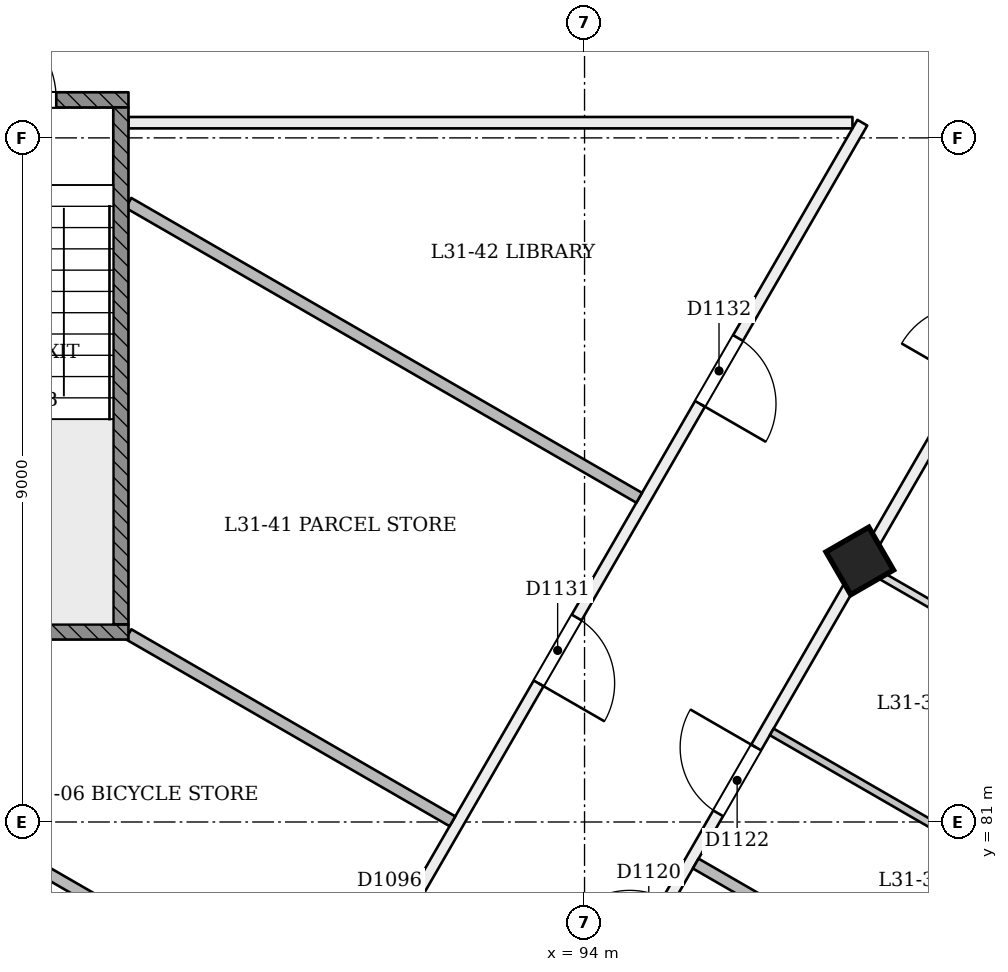
"""IFC4 building model, lengths in metres.
Left out: names, types, materials, properties, quantities, classifications, styles, units other than length and angle.
Written with IfcOpenShell. Run it as: python <this file> out.ifc"""

import sys

from ifc_helpers import new_model, si_unit, direction, frame, frame_2d, origin, origin_2d, place, context, subcontext, project, spatial, rectangle, extrude, element, fill, save


model = new_model("IFC4")
c1 = context("Model", 3, precision=1e-05, world=origin(), true_north=direction((0.0, 1.0)))
c2 = subcontext(c1, "Body", "Model", "MODEL_VIEW")
j1 = project(units=[si_unit("LENGTHUNIT", "METRE"), si_unit("PLANEANGLEUNIT", "RADIAN")], contexts=[c1])
p1 = place(None, origin())
s1 = spatial("IfcSite", under=j1, at=p1, CompositionType="ELEMENT")
p2 = place(p1, origin())
s2 = spatial("IfcBuilding", under=s1, at=p2, CompositionType="ELEMENT")
p3 = place(p2, frame((0.0, 0.0, 124.2)))
s3 = spatial("IfcBuildingStorey", under=s2, at=p3, CompositionType="ELEMENT", Elevation=124.2)
p4 = place(p3, frame((97.648, 84.387, -0.02), z_axis=(-0.022221406801, 0.038413224561, 0.999014831351), x_axis=(-0.499510250399, -0.866023767971, 0.022188804714)))
e1 = element("IfcColumn", 1, at=p4, inside=s3, PredefinedType="COLUMN", context=c2, shape_type="SweptSolid", body=[
    extrude(rectangle(XDim=0.65, YDim=0.65, at=origin_2d()), origin(), (0.0, 0.0, 1.0), 3.604),
])
p5 = place(p3, frame((97.655, 90.2, 0.0), z_axis=(0.0, 0.0, 1.0), x_axis=(-0.5000058613, -0.866022019735, 0.0)))
e2 = element("IfcWall", 2, at=p5, inside=s3, PredefinedType="PARTITIONING", context=c2, shape_type="SweptSolid", body=[
    extrude(rectangle(XDim=25.179, YDim=0.15, at=frame_2d((12.59, 0.0))), origin(), (0.0, 0.0, 1.0), 3.15),
])
p6 = place(p5, frame((11.939, 0.0, 0.0)))
e3 = element("IfcOpeningElement", 3, at=p6, cuts=e2, PredefinedType="OPENING", context=c2, shape_type="SweptSolid", body=[
    extrude(rectangle(XDim=1.0, YDim=2.1, at=frame_2d((0.5, 1.05))), frame((0.0, 0.085, 0.0), z_axis=(0.0, -1.0, 0.0), x_axis=(1.0, 0.0, 0.0)), (0.0, 0.0, 1.0), 0.171),
])
p7 = place(p5, frame((7.517, 0.0, 0.0)))
e4 = element("IfcOpeningElement", 4, at=p7, cuts=e2, PredefinedType="OPENING", context=c2, shape_type="SweptSolid", body=[
    extrude(rectangle(XDim=1.0, YDim=2.1, at=frame_2d((0.5, 1.05))), frame((0.0, 0.085, 0.0), z_axis=(0.0, -1.0, 0.0), x_axis=(1.0, 0.0, 0.0)), (0.0, 0.0, 1.0), 0.171),
])
p8 = place(p5, frame((3.271, 0.0, 0.0)))
e5 = element("IfcOpeningElement", 5, at=p8, cuts=e2, PredefinedType="OPENING", context=c2, shape_type="SweptSolid", body=[
    extrude(rectangle(XDim=1.0, YDim=2.1, at=frame_2d((0.5, 1.05))), frame((0.0, 0.085, 0.0), z_axis=(0.0, -1.0, 0.0), x_axis=(1.0, 0.0, 0.0)), (0.0, 0.0, 1.0), 0.171),
])
p9 = place(p5, frame((14.95, 0.0, 0.0)))
e6 = element("IfcOpeningElement", 6, at=p9, cuts=e2, PredefinedType="OPENING", context=c2, shape_type="SweptSolid", body=[
    extrude(rectangle(XDim=1.0, YDim=2.1, at=frame_2d((0.5, 1.05))), frame((0.0, 0.085, 0.0), z_axis=(0.0, -1.0, 0.0), x_axis=(1.0, 0.0, 0.0)), (0.0, 0.0, 1.0), 0.171),
])
p10 = place(p5, frame((18.033, 0.0, 0.0)))
e7 = element("IfcOpeningElement", 7, at=p10, cuts=e2, PredefinedType="OPENING", context=c2, shape_type="SweptSolid", body=[
    extrude(rectangle(XDim=1.0, YDim=2.1, at=frame_2d((0.5, 1.05))), frame((0.0, 0.085, 0.0), z_axis=(0.0, -1.0, 0.0), x_axis=(1.0, 0.0, 0.0)), (0.0, 0.0, 1.0), 0.171),
])
p11 = place(p3, frame((85.208, 62.842, 0.0), z_axis=(0.0, 0.0, 1.0), x_axis=(0.499999338616, 0.866025785634, 0.0)))
e8 = element("IfcWall", 8, at=p11, inside=s3, PredefinedType="PARTITIONING", context=c2, shape_type="SweptSolid", body=[
    extrude(rectangle(XDim=40.758, YDim=0.15, at=frame_2d((20.379, 0.0))), origin(), (0.0, 0.0, 1.0), 2.75),
])
p12 = place(p11, frame((0.295, 0.0, 0.0)))
e9 = element("IfcOpeningElement", 9, at=p12, cuts=e8, PredefinedType="OPENING", context=c2, shape_type="SweptSolid", body=[
    extrude(rectangle(XDim=1.2, YDim=2.1, at=frame_2d((0.6, 1.05))), frame((0.0, 0.085, 0.0), z_axis=(0.0, -1.0, 0.0), x_axis=(1.0, 0.0, 0.0)), (0.0, 0.0, 1.0), 0.171),
])
p13 = place(p11, frame((4.129, 0.0, 0.0)))
e10 = element("IfcOpeningElement", 10, at=p13, cuts=e8, PredefinedType="OPENING", context=c2, shape_type="SweptSolid", body=[
    extrude(rectangle(XDim=1.0, YDim=2.1, at=frame_2d((0.5, 1.05))), frame((0.0, 0.085, 0.0), z_axis=(0.0, -1.0, 0.0), x_axis=(1.0, 0.0, 0.0)), (0.0, 0.0, 1.0), 0.171),
])
p14 = place(p11, frame((9.659, 0.0, 0.0)))
e11 = element("IfcOpeningElement", 11, at=p14, cuts=e8, PredefinedType="OPENING", context=c2, shape_type="SweptSolid", body=[
    extrude(rectangle(XDim=1.0, YDim=2.1, at=frame_2d((0.5, 1.05))), frame((0.0, 0.085, 0.0), z_axis=(0.0, -1.0, 0.0), x_axis=(1.0, 0.0, 0.0)), (0.0, 0.0, 1.0), 0.171),
])
p15 = place(p11, frame((11.984, 0.0, 0.0)))
e12 = element("IfcOpeningElement", 12, at=p15, cuts=e8, PredefinedType="OPENING", context=c2, shape_type="SweptSolid", body=[
    extrude(rectangle(XDim=1.0, YDim=2.1, at=frame_2d((0.5, 1.05))), frame((0.0, 0.085, 0.0), z_axis=(0.0, -1.0, 0.0), x_axis=(1.0, 0.0, 0.0)), (0.0, 0.0, 1.0), 0.171),
])
p16 = place(p11, frame((18.774, 0.0, 0.0)))
e13 = element("IfcOpeningElement", 13, at=p16, cuts=e8, PredefinedType="OPENING", context=c2, shape_type="SweptSolid", body=[
    extrude(rectangle(XDim=1.0, YDim=2.1, at=frame_2d((0.5, 1.05))), frame((0.0, 0.085, 0.0), z_axis=(0.0, -1.0, 0.0), x_axis=(1.0, 0.0, 0.0)), (0.0, 0.0, 1.0), 0.171),
])
p17 = place(p11, frame((21.099, 0.0, 0.0)))
e14 = element("IfcOpeningElement", 14, at=p17, cuts=e8, PredefinedType="OPENING", context=c2, shape_type="SweptSolid", body=[
    extrude(rectangle(XDim=1.0, YDim=2.1, at=frame_2d((0.5, 1.05))), frame((0.0, 0.085, 0.0), z_axis=(0.0, -1.0, 0.0), x_axis=(1.0, 0.0, 0.0)), (0.0, 0.0, 1.0), 0.171),
])
p18 = place(p11, frame((27.659, 0.0, 0.0)))
e15 = element("IfcOpeningElement", 15, at=p18, cuts=e8, PredefinedType="OPENING", context=c2, shape_type="SweptSolid", body=[
    extrude(rectangle(XDim=1.0, YDim=2.1, at=frame_2d((0.5, 1.05))), frame((0.0, 0.085, 0.0), z_axis=(0.0, -1.0, 0.0), x_axis=(1.0, 0.0, 0.0)), (0.0, 0.0, 1.0), 0.171),
])
p19 = place(p11, frame((30.099, 0.0, 0.0)))
e16 = element("IfcOpeningElement", 16, at=p19, cuts=e8, PredefinedType="OPENING", context=c2, shape_type="SweptSolid", body=[
    extrude(rectangle(XDim=1.0, YDim=2.1, at=frame_2d((0.5, 1.05))), frame((0.0, 0.085, 0.0), z_axis=(0.0, -1.0, 0.0), x_axis=(1.0, 0.0, 0.0)), (0.0, 0.0, 1.0), 0.171),
])
p20 = place(p11, frame((39.358, 0.0, 0.0)))
e17 = element("IfcOpeningElement", 17, at=p20, cuts=e8, PredefinedType="OPENING", context=c2, shape_type="SweptSolid", body=[
    extrude(rectangle(XDim=1.2, YDim=2.1, at=frame_2d((0.6, 1.05))), frame((0.0, 0.085, 0.0), z_axis=(0.0, -1.0, 0.0), x_axis=(1.0, 0.0, 0.0)), (0.0, 0.0, 1.0), 0.171),
])
p21 = place(p3, frame((88.0, 90.2, 0.0), z_axis=(0.0, 0.0, 1.0), x_axis=(1.0, 0.0, 0.0)))
e18 = element("IfcWall", 18, at=p21, inside=s3, PredefinedType="PARTITIONING", context=c2, shape_type="SweptSolid", body=[
    extrude(rectangle(XDim=9.525, YDim=0.15, at=frame_2d((4.762, 0.0))), origin(), (0.0, 0.0, 1.0), 3.15),
])
p22 = place(p3, frame((92.262, 81.01, 0.0), z_axis=(0.0, 0.0, 1.0), x_axis=(-0.866021185894, 0.500007305529, 0.0)))
e19 = element("IfcWall", 19, at=p22, inside=s3, PredefinedType="PARTITIONING", context=c2, shape_type="SweptSolid", body=[
    extrude(rectangle(XDim=4.921, YDim=0.15, at=frame_2d((2.461, 0.0))), origin(), (0.0, 0.0, 1.0), 3.15),
])
p23 = place(p3, frame((83.296, 82.43, 0.0), z_axis=(0.0, 0.0, 1.0), x_axis=(0.866029193349, -0.499993436224, 0.0)))
e20 = element("IfcWall", 20, at=p23, inside=s3, PredefinedType="PARTITIONING", context=c2, shape_type="SweptSolid", body=[
    extrude(rectangle(XDim=8.475, YDim=0.15, at=frame_2d((4.237, 0.0))), origin(), (0.0, 0.0, 1.0), 3.15),
])
p24 = place(p3, frame((100.958, 77.281, 0.0), z_axis=(0.0, 0.0, 1.0), x_axis=(-0.866042062017, 0.499971145986, 0.0)))
e21 = element("IfcWall", 21, at=p24, inside=s3, PredefinedType="PARTITIONING", context=c2, shape_type="SweptSolid", body=[
    extrude(rectangle(XDim=6.345, YDim=0.15, at=frame_2d((3.172, 0.0))), origin(), (0.0, 0.0, 1.0), 2.65),
])
p25 = place(p3, frame((98.909, 80.773, 0.0), z_axis=(0.0, 0.0, 1.0), x_axis=(-0.866011447264, 0.500024172624, 0.0)))
e22 = element("IfcWall", 22, at=p25, inside=s3, PredefinedType="PARTITIONING", context=c2, shape_type="SweptSolid", body=[
    extrude(rectangle(XDim=2.825, YDim=0.1, at=frame_2d((1.413, 0.0))), origin(), (0.0, 0.0, 1.0), 3.15),
])
p26 = place(p3, frame((100.116, 82.963, 0.0), z_axis=(0.0, 0.0, 1.0), x_axis=(-0.866020020486, 0.50000932403, 0.0)))
e23 = element("IfcWall", 23, at=p26, inside=s3, PredefinedType="PARTITIONING", context=c2, shape_type="SweptSolid", body=[
    extrude(rectangle(XDim=2.775, YDim=0.1, at=frame_2d((1.387, 0.0))), origin(), (0.0, 0.0, 1.0), 2.75),
])
p27 = place(p3, frame((94.719, 85.265, 0.0), z_axis=(0.0, 0.0, 1.0), x_axis=(-0.866015276346, 0.500017540828, 0.0)))
e24 = element("IfcWall", 24, at=p27, inside=s3, PredefinedType="PARTITIONING", context=c2, shape_type="SweptSolid", body=[
    extrude(rectangle(XDim=7.759, YDim=0.15, at=frame_2d((3.879, 0.0))), origin(), (0.0, 0.0, 1.0), 3.15),
])
p28 = place(p3, frame((82.0, 90.5, 0.0), z_axis=(0.0, 0.0, 1.0), x_axis=(1.0, 0.0, 0.0)))
e25 = element("IfcWall", 25, at=p28, inside=s3, PredefinedType="SOLIDWALL", context=c2, shape_type="SweptSolid", body=[
    extrude(rectangle(XDim=6.0, YDim=0.2, at=frame_2d((3.0, 0.0))), origin(), (0.0, 0.0, 1.0), 3.15),
])
p29 = place(p28, frame((0.95, 0.0, 0.0)))
e26 = element("IfcOpeningElement", 26, at=p29, cuts=e25, PredefinedType="OPENING", context=c2, shape_type="SweptSolid", body=[
    extrude(rectangle(XDim=1.2, YDim=2.1, at=frame_2d((0.6, 1.05))), frame((0.0, 0.11, 0.0), z_axis=(0.0, -1.0, 0.0), x_axis=(1.0, 0.0, 0.0)), (0.0, 0.0, 1.0), 0.221),
])
p30 = place(p28, frame((3.85, 0.0, 0.0)))
e27 = element("IfcOpeningElement", 27, at=p30, cuts=e25, PredefinedType="OPENING", context=c2, shape_type="SweptSolid", body=[
    extrude(rectangle(XDim=1.2, YDim=2.1, at=frame_2d((0.6, 1.05))), frame((0.0, 0.11, 0.0), z_axis=(0.0, -1.0, 0.0), x_axis=(1.0, 0.0, 0.0)), (0.0, 0.0, 1.0), 0.221),
])
p31 = place(p3, frame((82.0, 83.5, 0.0), z_axis=(0.0, 0.0, 1.0), x_axis=(1.0, 0.0, 0.0)))
e28 = element("IfcWall", 28, at=p31, inside=s3, PredefinedType="SOLIDWALL", context=c2, shape_type="SweptSolid", body=[
    extrude(rectangle(XDim=6.0, YDim=0.2, at=frame_2d((3.0, 0.0))), origin(), (0.0, 0.0, 1.0), 3.15),
])
p32 = place(p3, frame((87.9, 83.6, 0.0), z_axis=(0.0, 0.0, 1.0), x_axis=(0.0, 1.0, 0.0)))
e29 = element("IfcWall", 29, at=p32, inside=s3, PredefinedType="SOLIDWALL", context=c2, shape_type="SweptSolid", body=[
    extrude(rectangle(XDim=6.8, YDim=0.2, at=frame_2d((3.4, 0.0))), origin(), (0.0, 0.0, 1.0), 3.15),
])
p33 = place(p17, origin())
e30 = element("IfcDoor", 30, at=p33, inside=s3, OperationType="SINGLE_SWING_RIGHT", PredefinedType="NOTDEFINED", context=c2, shape_type="SweptSolid", body=[
    extrude(rectangle(XDim=1.0, YDim=2.1, at=frame_2d((0.5, 1.05))), frame((0.0, 0.025, 0.0), z_axis=(0.0, -1.0, 0.0), x_axis=(1.0, 0.0, 0.0)), (0.0, 0.0, 1.0), 0.05),
])
fill(e14, e30)
p34 = place(p7, origin())
e31 = element("IfcDoor", 31, at=p34, inside=s3, OperationType="SINGLE_SWING_RIGHT", PredefinedType="NOTDEFINED", context=c2, shape_type="SweptSolid", body=[
    extrude(rectangle(XDim=1.0, YDim=2.1, at=frame_2d((0.5, 1.05))), frame((0.0, 0.025, 0.0), z_axis=(0.0, -1.0, 0.0), x_axis=(1.0, 0.0, 0.0)), (0.0, 0.0, 1.0), 0.05),
])
fill(e4, e31)
p35 = place(p8, origin())
e32 = element("IfcDoor", 32, at=p35, inside=s3, OperationType="SINGLE_SWING_RIGHT", PredefinedType="NOTDEFINED", context=c2, shape_type="SweptSolid", body=[
    extrude(rectangle(XDim=1.0, YDim=2.1, at=frame_2d((0.5, 1.05))), frame((0.0, 0.025, 0.0), z_axis=(0.0, -1.0, 0.0), x_axis=(1.0, 0.0, 0.0)), (0.0, 0.0, 1.0), 0.05),
])
fill(e5, e32)
p36 = place(p30, origin())
e33 = element("IfcDoor", 33, at=p36, inside=s3, OperationType="SINGLE_SWING_LEFT", PredefinedType="NOTDEFINED", context=c2, shape_type="SweptSolid", body=[
    extrude(rectangle(XDim=1.2, YDim=2.1, at=frame_2d((0.6, 1.05))), frame((0.0, 0.025, 0.0), z_axis=(0.0, -1.0, 0.0), x_axis=(1.0, 0.0, 0.0)), (0.0, 0.0, 1.0), 0.05),
])
fill(e27, e33)
save(model, sys.argv[1])
